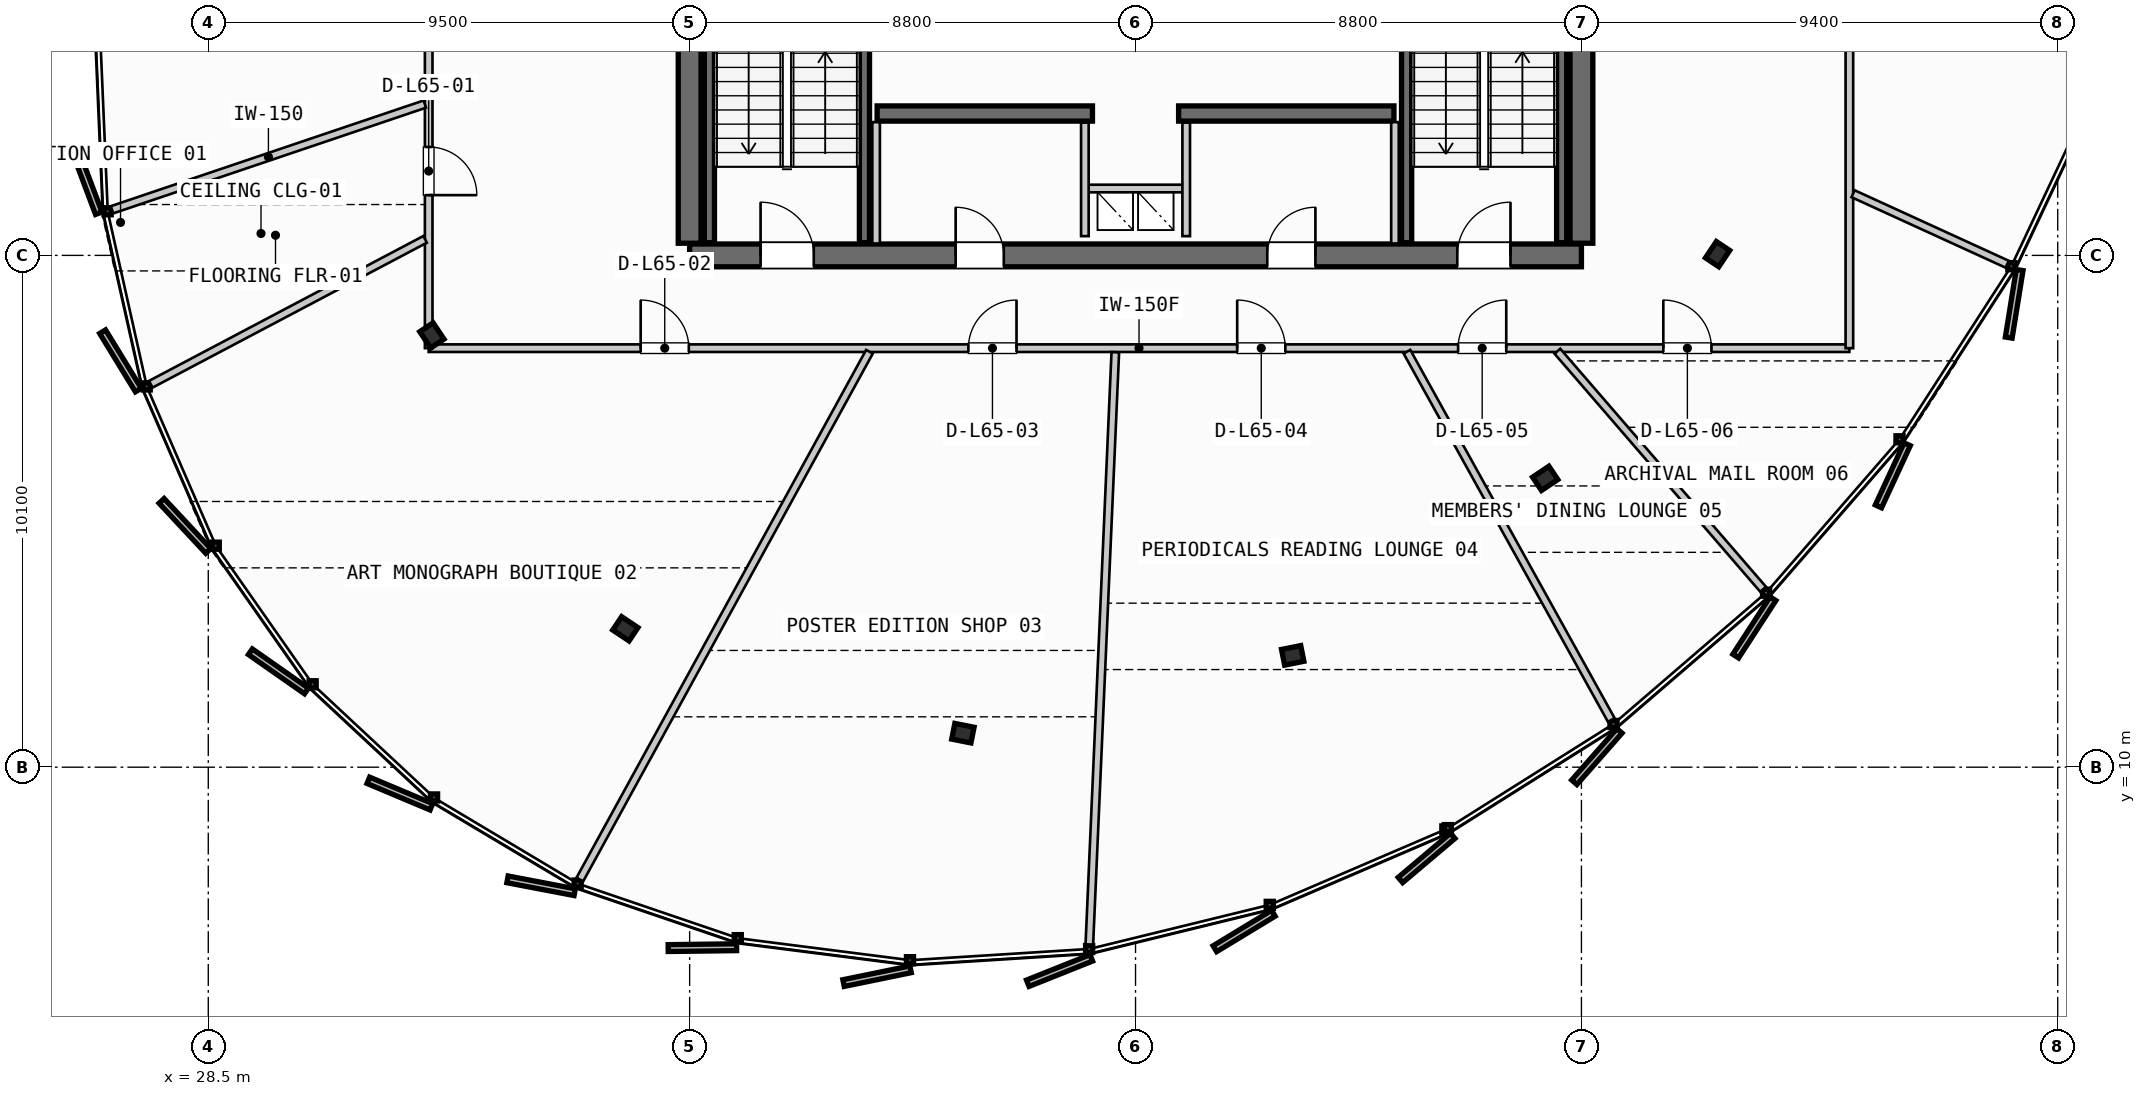
"""IFC4 building model, lengths in metres.
Left out: names, types, materials, properties, quantities, classifications, styles, units other than length and angle.
Written with IfcOpenShell. Run it as: python <this file> out.ifc"""

import sys

from ifc_helpers import new_model, si_unit, direction, frame, frame_2d, origin, origin_2d, place, context, subcontext, project, spatial, rectangle, i_section, extrude, source, transform, mapped, element, fill, save


model = new_model("IFC4")
c1 = context("Model", 3, precision=1e-05, world=origin(), true_north=direction((0.0, 1.0)))
c2 = subcontext(c1, "Body", "Model", "MODEL_VIEW")
j1 = project(units=[si_unit("LENGTHUNIT", "METRE"), si_unit("PLANEANGLEUNIT", "RADIAN")], contexts=[c1])
p1 = place(None, origin())
s1 = spatial("IfcSite", under=j1, at=p1, CompositionType="ELEMENT")
p2 = place(p1, origin())
s2 = spatial("IfcBuilding", under=s1, at=p2, CompositionType="ELEMENT")
p3 = place(p2, frame((0.0, 0.0, 249.1)))
s3 = spatial("IfcBuildingStorey", under=s2, at=p3, CompositionType="ELEMENT", Elevation=249.1)
p4 = place(p3, frame((38.0, 20.1, 0.0), z_axis=(0.0, 0.0, 1.0), x_axis=(1.0, 0.0, 0.0)))
e1 = element("IfcWall", 1, at=p4, inside=s3, PredefinedType="SHEAR", context=c2, shape_type="SweptSolid", body=[
    extrude(rectangle(XDim=17.6, YDim=0.45, at=frame_2d((8.8, 0.0))), origin(), (0.0, 0.0, 1.0), 3.21),
])
p5 = place(p4, frame((1.4, 0.0, 0.0)))
e2 = element("IfcOpeningElement", 2, at=p5, cuts=e1, PredefinedType="OPENING", context=c2, shape_type="SweptSolid", body=[
    extrude(rectangle(XDim=1.05, YDim=2.15, at=frame_2d((0.525, 1.075))), frame((0.0, 0.235, 0.0), z_axis=(0.0, -1.0, 0.0), x_axis=(1.0, 0.0, 0.0)), (0.0, 0.0, 1.0), 0.47),
])
p6 = place(p4, frame((15.15, 0.0, 0.0)))
e3 = element("IfcOpeningElement", 3, at=p6, cuts=e1, PredefinedType="OPENING", context=c2, shape_type="SweptSolid", body=[
    extrude(rectangle(XDim=1.05, YDim=2.15, at=frame_2d((0.525, 1.075))), frame((0.0, 0.235, 0.0), z_axis=(0.0, -1.0, 0.0), x_axis=(1.0, 0.0, 0.0)), (0.0, 0.0, 1.0), 0.47),
])
p7 = place(p4, frame((5.25, 0.0, 0.0)))
e4 = element("IfcOpeningElement", 4, at=p7, cuts=e1, PredefinedType="OPENING", context=c2, shape_type="SweptSolid", body=[
    extrude(rectangle(XDim=0.95, YDim=2.15, at=frame_2d((0.475, 1.075))), frame((0.0, 0.235, 0.0), z_axis=(0.0, -1.0, 0.0), x_axis=(1.0, 0.0, 0.0)), (0.0, 0.0, 1.0), 0.47),
])
p8 = place(p4, frame((11.4, 0.0, 0.0)))
e5 = element("IfcOpeningElement", 5, at=p8, cuts=e1, PredefinedType="OPENING", context=c2, shape_type="SweptSolid", body=[
    extrude(rectangle(XDim=0.95, YDim=2.15, at=frame_2d((0.475, 1.075))), frame((0.0, 0.235, 0.0), z_axis=(0.0, -1.0, 0.0), x_axis=(1.0, 0.0, 0.0)), (0.0, 0.0, 1.0), 0.47),
])
p9 = place(p3, frame((38.0, 35.26, 0.0), z_axis=(0.0, 0.0, 1.0), x_axis=(0.0, -1.0, 0.0)))
e6 = element("IfcWall", 6, at=p9, inside=s3, PredefinedType="SHEAR", context=c2, shape_type="SweptSolid", body=[
    extrude(rectangle(XDim=14.92, YDim=0.45, at=frame_2d((7.46, 0.0))), origin(), (0.0, 0.0, 1.0), 3.21),
])
p10 = place(p9, frame((5.21, 0.0, 0.0)))
e7 = element("IfcOpeningElement", 7, at=p10, cuts=e6, PredefinedType="OPENING", context=c2, shape_type="SweptSolid", body=[
    extrude(rectangle(XDim=1.1, YDim=2.2, at=frame_2d((0.55, 1.1))), frame((0.0, 0.235, 0.0), z_axis=(0.0, -1.0, 0.0), x_axis=(1.0, 0.0, 0.0)), (0.0, 0.0, 1.0), 0.47),
])
p11 = place(p3, frame((55.6, 20.34, 0.0), z_axis=(0.0, 0.0, 1.0), x_axis=(0.0, 1.0, 0.0)))
e8 = element("IfcWall", 8, at=p11, inside=s3, PredefinedType="SHEAR", context=c2, shape_type="SweptSolid", body=[
    extrude(rectangle(XDim=14.92, YDim=0.45, at=frame_2d((7.46, 0.0))), origin(), (0.0, 0.0, 1.0), 3.21),
])
p12 = place(p11, frame((12.71, 0.0, 0.0)))
e9 = element("IfcOpeningElement", 9, at=p12, cuts=e8, PredefinedType="OPENING", context=c2, shape_type="SweptSolid", body=[
    extrude(rectangle(XDim=1.05, YDim=2.15, at=frame_2d((0.525, 1.075))), frame((0.0, 0.235, 0.0), z_axis=(0.0, -1.0, 0.0), x_axis=(1.0, 0.0, 0.0)), (0.0, 0.0, 1.0), 0.47),
])
p13 = place(p11, frame((8.61, 0.0, 0.0)))
e10 = element("IfcOpeningElement", 10, at=p13, cuts=e8, PredefinedType="OPENING", context=c2, shape_type="SweptSolid", body=[
    extrude(rectangle(XDim=1.1, YDim=2.2, at=frame_2d((0.55, 1.1))), frame((0.0, 0.235, 0.0), z_axis=(0.0, -1.0, 0.0), x_axis=(1.0, 0.0, 0.0)), (0.0, 0.0, 1.0), 0.47),
])
for number, where, z_axis, x_axis in (
    (11, (41.7, 22.9, 0.0), (0.0, 0.0, 1.0), (1.0, 0.0, 0.0)),
    (12, (47.65, 22.9, 0.0), (0.0, 0.0, 1.0), (1.0, 0.0, 0.0)),
):
    element("IfcWall", number, at=place(p3, frame(where, z_axis=z_axis, x_axis=x_axis)), inside=s3, PredefinedType="SHEAR", context=c2, shape_type="SweptSolid", body=[
        extrude(rectangle(XDim=4.25, YDim=0.3, at=frame_2d((2.125, 0.0))), origin(), (0.0, 0.0, 1.0), 3.21),
    ])
m1 = source(origin(), c2, "Body", "SweptSolid", [
    extrude(i_section(OverallWidth=0.387, OverallDepth=0.316, WebThickness=0.019, FlangeThickness=0.028, FilletRadius=0.015, at=origin_2d()), origin(), (0.0, 0.0, 1.0), 3.21),
])
for number, where, z_axis, x_axis in (
    (13, (32.913, 18.521, 0.0), (0.0, 0.0, 1.0), (-0.831, -0.556, 0.0)),
    (14, (36.731, 12.731, 0.0), (0.0, 0.0, 1.0), (-0.556, -0.831, 0.0)),
    (15, (43.393, 10.671, 0.0), (0.0, 0.0, 1.0), (-0.195, -0.981, 0.0)),
    (16, (49.902, 12.207, 0.0), (0.0, 0.0, 1.0), (0.195, -0.981, 0.0)),
    (17, (54.885, 15.7, 0.0), (0.0, 0.0, 1.0), (0.556, -0.831, 0.0)),
    (18, (58.287, 20.125, 0.0), (0.0, 0.0, 1.0), (0.831, -0.556, 0.0)),
):
    element("IfcColumn", number, at=place(p3, frame(where, z_axis=z_axis, x_axis=x_axis)), inside=s3, PredefinedType="COLUMN", context=c2, shape_type="MappedRepresentation", body=[
        mapped(m1, transform((0.0, 0.0, 0.0), scale=1.0)),
    ])
for number, where, z_axis, x_axis in (
    (19, (41.45, 27.7, 0.0), (0.0, 0.0, 1.0), (0.0, -1.0, 0.0)),
    (20, (38.39, 20.35, 0.0), (0.0, 0.0, 1.0), (0.0, 1.0, 0.0)),
    (21, (55.21, 27.7, 0.0), (0.0, 0.0, 1.0), (0.0, -1.0, 0.0)),
    (22, (52.15, 20.35, 0.0), (0.0, 0.0, 1.0), (0.0, 1.0, 0.0)),
):
    element("IfcWall", number, at=place(p3, frame(where, z_axis=z_axis, x_axis=x_axis)), inside=s3, PredefinedType="SHEAR", context=c2, shape_type="SweptSolid", body=[
        extrude(rectangle(XDim=7.35, YDim=0.2, at=frame_2d((3.675, 0.0))), origin(), (0.0, 0.0, 1.0), 3.21),
    ])
p14 = place(p3, frame((45.8, 21.42, 0.0), z_axis=(0.0, 0.0, 1.0), x_axis=(1.0, 0.0, 0.0)))
e23 = element("IfcWall", 23, at=p14, inside=s3, PredefinedType="PARTITIONING", context=c2, shape_type="SweptSolid", body=[
    extrude(rectangle(XDim=2.0, YDim=0.15, at=frame_2d((1.0, 0.0))), origin(), (0.0, 0.0, 1.0), 2.28),
])
for number, where, z_axis, x_axis in (
    (24, (45.8, 20.48, 0.0), (0.0, 0.0, 1.0), (0.0, 1.0, 0.0)),
    (25, (47.8, 20.48, 0.0), (0.0, 0.0, 1.0), (0.0, 1.0, 0.0)),
):
    element("IfcWall", number, at=place(p3, frame(where, z_axis=z_axis, x_axis=x_axis)), inside=s3, PredefinedType="PARTITIONING", context=c2, shape_type="SweptSolid", body=[
        extrude(rectangle(XDim=2.24, YDim=0.15, at=frame_2d((1.12, 0.0))), origin(), (0.0, 0.0, 1.0), 2.28),
    ])
for number, where, z_axis, x_axis in (
    (26, (41.68, 20.335, 0.0), (0.0, 0.0, 1.0), (0.0, 1.0, 0.0)),
    (27, (51.92, 20.335, 0.0), (0.0, 0.0, 1.0), (0.0, 1.0, 0.0)),
):
    element("IfcWall", number, at=place(p3, frame(where, z_axis=z_axis, x_axis=x_axis)), inside=s3, PredefinedType="PARTITIONING", context=c2, shape_type="SweptSolid", body=[
        extrude(rectangle(XDim=2.395, YDim=0.15, at=frame_2d((1.198, 0.0))), origin(), (0.0, 0.0, 1.0), 2.28),
    ])
p15 = place(p3, frame((32.85, 18.269, 0.0), z_axis=(0.0, 0.0, 1.0), x_axis=(1.0, 0.0, 0.0)))
e28 = element("IfcWall", 28, at=p15, inside=s3, PredefinedType="PARTITIONING", context=c2, shape_type="SweptSolid", body=[
    extrude(rectangle(XDim=28.038, YDim=0.15, at=frame_2d((14.019, 0.0))), origin(), (0.0, 0.0, 1.0), 2.28),
])
p16 = place(p15, frame((4.184, 0.0, 0.0)))
e29 = element("IfcOpeningElement", 29, at=p16, cuts=e28, PredefinedType="OPENING", context=c2, shape_type="SweptSolid", body=[
    extrude(rectangle(XDim=0.95, YDim=2.15, at=frame_2d((0.475, 1.075))), frame((0.0, 0.085, 0.0), z_axis=(0.0, -1.0, 0.0), x_axis=(1.0, 0.0, 0.0)), (0.0, 0.0, 1.0), 0.17),
])
p17 = place(p15, frame((10.651, 0.0, 0.0)))
e30 = element("IfcOpeningElement", 30, at=p17, cuts=e28, PredefinedType="OPENING", context=c2, shape_type="SweptSolid", body=[
    extrude(rectangle(XDim=0.95, YDim=2.15, at=frame_2d((0.475, 1.075))), frame((0.0, 0.085, 0.0), z_axis=(0.0, -1.0, 0.0), x_axis=(1.0, 0.0, 0.0)), (0.0, 0.0, 1.0), 0.17),
])
p18 = place(p15, frame((15.956, 0.0, 0.0)))
e31 = element("IfcOpeningElement", 31, at=p18, cuts=e28, PredefinedType="OPENING", context=c2, shape_type="SweptSolid", body=[
    extrude(rectangle(XDim=0.95, YDim=2.15, at=frame_2d((0.475, 1.075))), frame((0.0, 0.085, 0.0), z_axis=(0.0, -1.0, 0.0), x_axis=(1.0, 0.0, 0.0)), (0.0, 0.0, 1.0), 0.17),
])
p19 = place(p15, frame((20.316, 0.0, 0.0)))
e32 = element("IfcOpeningElement", 32, at=p19, cuts=e28, PredefinedType="OPENING", context=c2, shape_type="SweptSolid", body=[
    extrude(rectangle(XDim=0.95, YDim=2.15, at=frame_2d((0.475, 1.075))), frame((0.0, 0.085, 0.0), z_axis=(0.0, -1.0, 0.0), x_axis=(1.0, 0.0, 0.0)), (0.0, 0.0, 1.0), 0.17),
])
p20 = place(p15, frame((24.366, 0.0, 0.0)))
e33 = element("IfcOpeningElement", 33, at=p20, cuts=e28, PredefinedType="OPENING", context=c2, shape_type="SweptSolid", body=[
    extrude(rectangle(XDim=0.95, YDim=2.15, at=frame_2d((0.475, 1.075))), frame((0.0, 0.085, 0.0), z_axis=(0.0, -1.0, 0.0), x_axis=(1.0, 0.0, 0.0)), (0.0, 0.0, 1.0), 0.17),
])
p21 = place(p3, frame((60.888, 18.269, 0.0), z_axis=(0.0, 0.0, 1.0), x_axis=(0.0, 1.0, 0.0)))
e34 = element("IfcWall", 34, at=p21, inside=s3, PredefinedType="PARTITIONING", context=c2, shape_type="SweptSolid", body=[
    extrude(rectangle(XDim=19.293, YDim=0.15, at=frame_2d((9.646, 0.0))), origin(), (0.0, 0.0, 1.0), 2.28),
])
p22 = place(p21, frame((8.633, 0.0, 0.0)))
e35 = element("IfcOpeningElement", 35, at=p22, cuts=e34, PredefinedType="OPENING", context=c2, shape_type="SweptSolid", body=[
    extrude(rectangle(XDim=0.95, YDim=2.15, at=frame_2d((0.475, 1.075))), frame((0.0, 0.085, 0.0), z_axis=(0.0, -1.0, 0.0), x_axis=(1.0, 0.0, 0.0)), (0.0, 0.0, 1.0), 0.17),
])
p23 = place(p21, frame((16.081, 0.0, 0.0)))
e36 = element("IfcOpeningElement", 36, at=p23, cuts=e34, PredefinedType="OPENING", context=c2, shape_type="SweptSolid", body=[
    extrude(rectangle(XDim=0.95, YDim=2.15, at=frame_2d((0.475, 1.075))), frame((0.0, 0.085, 0.0), z_axis=(0.0, -1.0, 0.0), x_axis=(1.0, 0.0, 0.0)), (0.0, 0.0, 1.0), 0.17),
])
p24 = place(p3, frame((32.85, 37.562, 0.0), z_axis=(0.0, 0.0, 1.0), x_axis=(0.0, -1.0, 0.0)))
e37 = element("IfcWall", 37, at=p24, inside=s3, PredefinedType="PARTITIONING", context=c2, shape_type="SweptSolid", body=[
    extrude(rectangle(XDim=19.293, YDim=0.15, at=frame_2d((9.646, 0.0))), origin(), (0.0, 0.0, 1.0), 2.28),
])
p25 = place(p24, frame((15.323, 0.0, 0.0)))
e38 = element("IfcOpeningElement", 38, at=p25, cuts=e37, PredefinedType="OPENING", context=c2, shape_type="SweptSolid", body=[
    extrude(rectangle(XDim=0.95, YDim=2.15, at=frame_2d((0.475, 1.075))), frame((0.0, 0.085, 0.0), z_axis=(0.0, -1.0, 0.0), x_axis=(1.0, 0.0, 0.0)), (0.0, 0.0, 1.0), 0.17),
])
p26 = place(p24, frame((8.408, 0.0, 0.0)))
e39 = element("IfcOpeningElement", 39, at=p26, cuts=e37, PredefinedType="OPENING", context=c2, shape_type="SweptSolid", body=[
    extrude(rectangle(XDim=0.95, YDim=2.15, at=frame_2d((0.475, 1.075))), frame((0.0, 0.085, 0.0), z_axis=(0.0, -1.0, 0.0), x_axis=(1.0, 0.0, 0.0)), (0.0, 0.0, 1.0), 0.17),
])
p27 = place(p3, frame((32.774, 23.086, 0.0), z_axis=(0.0, 0.0, 1.0), x_axis=(-0.947398175778, -0.320057333196, 0.0)))
e40 = element("IfcWall", 40, at=p27, inside=s3, PredefinedType="PARTITIONING", context=c2, shape_type="SweptSolid", body=[
    extrude(rectangle(XDim=6.517, YDim=0.15, at=frame_2d((3.259, 0.0))), origin(), (0.0, 0.0, 1.0), 2.28),
])
p28 = place(p3, frame((32.779, 20.417, 0.0), z_axis=(0.0, 0.0, 1.0), x_axis=(-0.884246196303, -0.467021053406, 0.0)))
e41 = element("IfcWall", 41, at=p28, inside=s3, PredefinedType="PARTITIONING", context=c2, shape_type="SweptSolid", body=[
    extrude(rectangle(XDim=6.124, YDim=0.15, at=frame_2d((3.062, 0.0))), origin(), (0.0, 0.0, 1.0), 2.28),
])
p29 = place(p3, frame((41.549, 18.199, 0.0), z_axis=(0.0, 0.0, 1.0), x_axis=(-0.481079238788, -0.876677116165, 0.0)))
e42 = element("IfcWall", 42, at=p29, inside=s3, PredefinedType="PARTITIONING", context=c2, shape_type="SweptSolid", body=[
    extrude(rectangle(XDim=11.881, YDim=0.15, at=frame_2d((5.941, 0.0))), origin(), (0.0, 0.0, 1.0), 2.28),
])
p30 = place(p3, frame((46.401, 18.189, 0.0), z_axis=(0.0, 0.0, 1.0), x_axis=(-0.043824832554, -0.999039230487, 0.0)))
e43 = element("IfcWall", 43, at=p30, inside=s3, PredefinedType="PARTITIONING", context=c2, shape_type="SweptSolid", body=[
    extrude(rectangle(XDim=11.699, YDim=0.15, at=frame_2d((5.849, 0.0))), origin(), (0.0, 0.0, 1.0), 2.28),
])
p31 = place(p3, frame((52.156, 18.199, 0.0), z_axis=(0.0, 0.0, 1.0), x_axis=(0.485188936887, -0.87440934094, 0.0)))
e44 = element("IfcWall", 44, at=p31, inside=s3, PredefinedType="PARTITIONING", context=c2, shape_type="SweptSolid", body=[
    extrude(rectangle(XDim=8.311, YDim=0.15, at=frame_2d((4.156, 0.0))), origin(), (0.0, 0.0, 1.0), 2.28),
])
p32 = place(p3, frame((55.126, 18.208, 0.0), z_axis=(0.0, 0.0, 1.0), x_axis=(0.653881930086, -0.756596604213, 0.0)))
e45 = element("IfcWall", 45, at=p32, inside=s3, PredefinedType="PARTITIONING", context=c2, shape_type="SweptSolid", body=[
    extrude(rectangle(XDim=6.208, YDim=0.15, at=frame_2d((3.104, 0.0))), origin(), (0.0, 0.0, 1.0), 2.28),
])
p33 = place(p3, frame((60.961, 21.317, 0.0), z_axis=(0.0, 0.0, 1.0), x_axis=(0.909386961263, -0.415951144589, 0.0)))
e46 = element("IfcWall", 46, at=p33, inside=s3, PredefinedType="PARTITIONING", context=c2, shape_type="SweptSolid", body=[
    extrude(rectangle(XDim=3.346, YDim=0.15, at=frame_2d((1.673, 0.0))), origin(), (0.0, 0.0, 1.0), 2.28),
])
m2 = source(origin(), c2, "Body", "SweptSolid", [
    extrude(rectangle(XDim=1.05, YDim=2.15, at=frame_2d((0.525, 1.075))), frame((0.0, 0.025, 0.0), z_axis=(0.0, -1.0, 0.0), x_axis=(1.0, 0.0, 0.0)), (0.0, 0.0, 1.0), 0.05),
])
p34 = place(p5, origin())
e47 = element("IfcDoor", 47, at=p34, inside=s3, OperationType="SINGLE_SWING_LEFT", PredefinedType="DOOR", context=c2, shape_type="MappedRepresentation", body=[
    mapped(m2, transform((0.0, 0.0, 0.0), scale=1.0)),
])
fill(e2, e47)
p35 = place(p6, origin())
e48 = element("IfcDoor", 48, at=p35, inside=s3, OperationType="SINGLE_SWING_RIGHT", PredefinedType="DOOR", context=c2, shape_type="MappedRepresentation", body=[
    mapped(m2, transform((0.0, 0.0, 0.0), scale=1.0)),
])
fill(e3, e48)
m3 = source(origin(), c2, "Body", "SweptSolid", [
    extrude(rectangle(XDim=0.95, YDim=2.15, at=frame_2d((0.475, 1.075))), frame((0.0, 0.025, 0.0), z_axis=(0.0, -1.0, 0.0), x_axis=(1.0, 0.0, 0.0)), (0.0, 0.0, 1.0), 0.05),
])
p36 = place(p7, origin())
e49 = element("IfcDoor", 49, at=p36, inside=s3, OperationType="SINGLE_SWING_LEFT", PredefinedType="DOOR", context=c2, shape_type="MappedRepresentation", body=[
    mapped(m3, transform((0.0, 0.0, 0.0), scale=1.0)),
])
fill(e4, e49)
p37 = place(p8, origin())
e50 = element("IfcDoor", 50, at=p37, inside=s3, OperationType="SINGLE_SWING_RIGHT", PredefinedType="DOOR", context=c2, shape_type="MappedRepresentation", body=[
    mapped(m3, transform((0.0, 0.0, 0.0), scale=1.0)),
])
fill(e5, e50)
p38 = place(p16, origin())
e51 = element("IfcDoor", 51, at=p38, inside=s3, OperationType="SINGLE_SWING_LEFT", PredefinedType="DOOR", context=c2, shape_type="MappedRepresentation", body=[
    mapped(m3, transform((0.0, 0.0, 0.0), scale=1.0)),
])
fill(e29, e51)
p39 = place(p17, origin())
e52 = element("IfcDoor", 52, at=p39, inside=s3, OperationType="SINGLE_SWING_RIGHT", PredefinedType="DOOR", context=c2, shape_type="MappedRepresentation", body=[
    mapped(m3, transform((0.0, 0.0, 0.0), scale=1.0)),
])
fill(e30, e52)
p40 = place(p18, origin())
e53 = element("IfcDoor", 53, at=p40, inside=s3, OperationType="SINGLE_SWING_LEFT", PredefinedType="DOOR", context=c2, shape_type="MappedRepresentation", body=[
    mapped(m3, transform((0.0, 0.0, 0.0), scale=1.0)),
])
fill(e31, e53)
p41 = place(p19, origin())
e54 = element("IfcDoor", 54, at=p41, inside=s3, OperationType="SINGLE_SWING_RIGHT", PredefinedType="DOOR", context=c2, shape_type="MappedRepresentation", body=[
    mapped(m3, transform((0.0, 0.0, 0.0), scale=1.0)),
])
fill(e32, e54)
p42 = place(p20, origin())
e55 = element("IfcDoor", 55, at=p42, inside=s3, OperationType="SINGLE_SWING_LEFT", PredefinedType="DOOR", context=c2, shape_type="MappedRepresentation", body=[
    mapped(m3, transform((0.0, 0.0, 0.0), scale=1.0)),
])
fill(e33, e55)
p43 = place(p25, origin())
e56 = element("IfcDoor", 56, at=p43, inside=s3, OperationType="SINGLE_SWING_RIGHT", PredefinedType="DOOR", context=c2, shape_type="MappedRepresentation", body=[
    mapped(m3, transform((0.0, 0.0, 0.0), scale=1.0)),
])
fill(e38, e56)
save(model, sys.argv[1])
